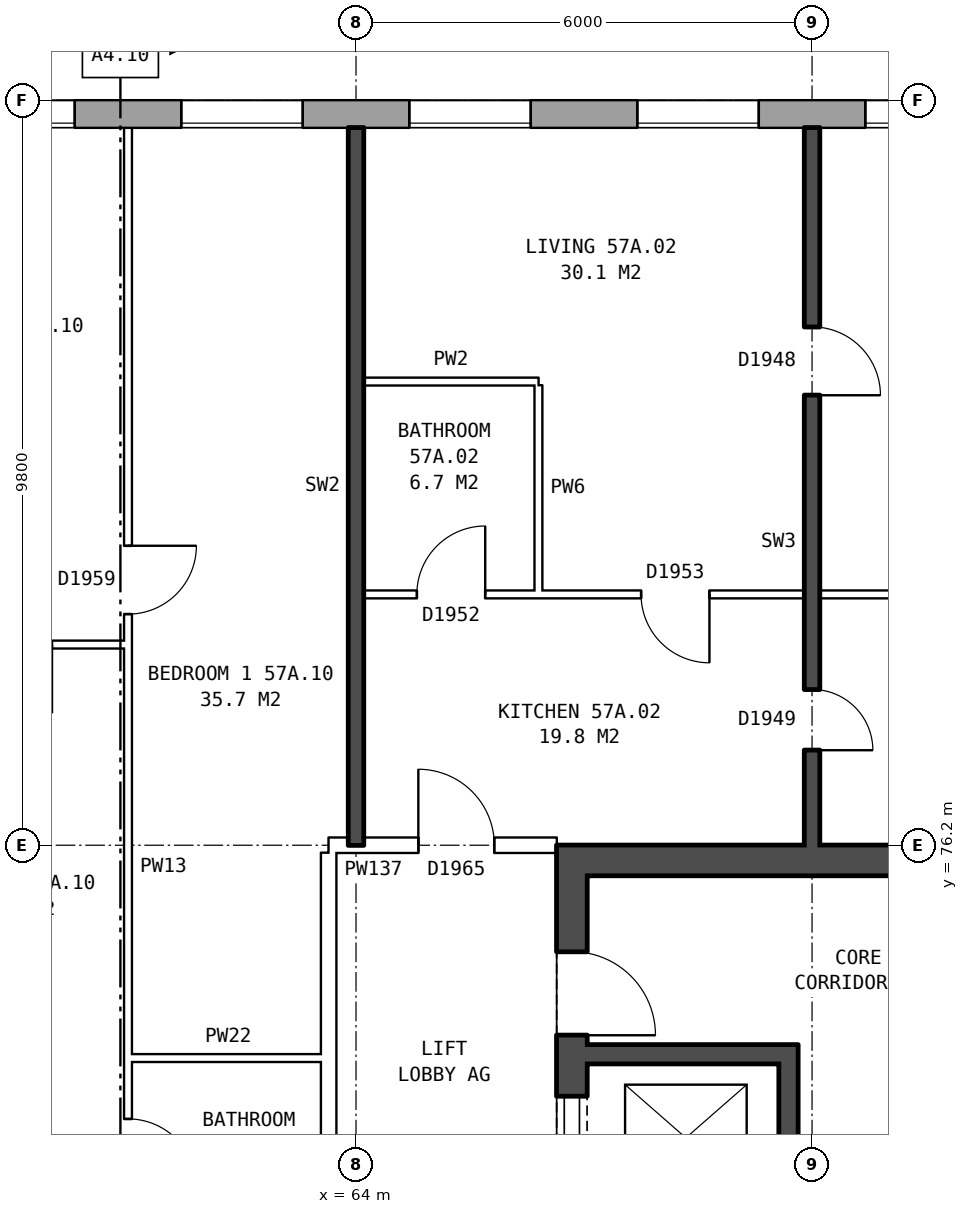
"""IFC4 building model, lengths in metres.
Left out: names, types, materials, properties, quantities, classifications, styles, units other than length and angle.
Written with IfcOpenShell. Run it as: python <this file> out.ifc"""

import sys

from ifc_helpers import new_model, si_unit, direction, frame, frame_2d, origin, place, context, subcontext, project, spatial, rectangle, extrude, element, fill, save


model = new_model("IFC4")
c1 = context("Model", 3, precision=1e-05, world=origin(), true_north=direction((0.0, 1.0)))
c2 = subcontext(c1, "Body", "Model", "MODEL_VIEW")
j1 = project(units=[si_unit("LENGTHUNIT", "METRE"), si_unit("PLANEANGLEUNIT", "RADIAN")], contexts=[c1])
p1 = place(None, origin())
s1 = spatial("IfcSite", under=j1, at=p1, CompositionType="ELEMENT")
p2 = place(p1, origin())
s2 = spatial("IfcBuilding", under=s1, at=p2, CompositionType="ELEMENT")
p3 = place(p2, frame((0.0, 0.0, 202.8)))
s3 = spatial("IfcBuildingStorey", under=s2, at=p3, CompositionType="ELEMENT", Elevation=202.8)
p4 = place(p3, frame((74.95, 85.82, 0.0), z_axis=(0.0, 0.0, 1.0), x_axis=(-1.0, 0.0, 0.0)))
e1 = element("IfcWall", 1, at=p4, inside=s3, PredefinedType="STANDARD", context=c2, shape_type="SweptSolid", body=[
    extrude(rectangle(XDim=39.875, YDim=0.36, at=frame_2d((19.938, 0.0))), origin(), (0.0, 0.0, 1.0), 2.85),
])
p5 = place(p4, frame((2.65, 0.0, 0.8)))
e2 = element("IfcOpeningElement", 2, at=p5, cuts=e1, PredefinedType="OPENING", context=c2, shape_type="SweptSolid", body=[
    extrude(rectangle(XDim=1.6, YDim=1.8, at=frame_2d((0.8, 0.9))), frame((0.0, 0.19, 0.0), z_axis=(0.0, -1.0, 0.0), x_axis=(1.0, 0.0, 0.0)), (0.0, 0.0, 1.0), 0.38),
])
p6 = place(p4, frame((5.65, 0.0, 0.8)))
e3 = element("IfcOpeningElement", 3, at=p6, cuts=e1, PredefinedType="OPENING", context=c2, shape_type="SweptSolid", body=[
    extrude(rectangle(XDim=1.6, YDim=1.8, at=frame_2d((0.8, 0.9))), frame((0.0, 0.19, 0.0), z_axis=(0.0, -1.0, 0.0), x_axis=(1.0, 0.0, 0.0)), (0.0, 0.0, 1.0), 0.38),
])
p7 = place(p4, frame((8.65, 0.0, 0.8)))
e4 = element("IfcOpeningElement", 4, at=p7, cuts=e1, PredefinedType="OPENING", context=c2, shape_type="SweptSolid", body=[
    extrude(rectangle(XDim=1.6, YDim=1.8, at=frame_2d((0.8, 0.9))), frame((0.0, 0.19, 0.0), z_axis=(0.0, -1.0, 0.0), x_axis=(1.0, 0.0, 0.0)), (0.0, 0.0, 1.0), 0.38),
])
p8 = place(p4, frame((11.65, 0.0, 0.8)))
e5 = element("IfcOpeningElement", 5, at=p8, cuts=e1, PredefinedType="OPENING", context=c2, shape_type="SweptSolid", body=[
    extrude(rectangle(XDim=1.6, YDim=1.8, at=frame_2d((0.8, 0.9))), frame((0.0, 0.19, 0.0), z_axis=(0.0, -1.0, 0.0), x_axis=(1.0, 0.0, 0.0)), (0.0, 0.0, 1.0), 0.38),
])
p9 = place(p4, frame((14.65, 0.0, 0.8)))
e6 = element("IfcOpeningElement", 6, at=p9, cuts=e1, PredefinedType="OPENING", context=c2, shape_type="SweptSolid", body=[
    extrude(rectangle(XDim=1.6, YDim=1.8, at=frame_2d((0.8, 0.9))), frame((0.0, 0.19, 0.0), z_axis=(0.0, -1.0, 0.0), x_axis=(1.0, 0.0, 0.0)), (0.0, 0.0, 1.0), 0.38),
])
p10 = place(p4, frame((17.65, 0.0, 0.8)))
e7 = element("IfcOpeningElement", 7, at=p10, cuts=e1, PredefinedType="OPENING", context=c2, shape_type="SweptSolid", body=[
    extrude(rectangle(XDim=1.6, YDim=1.8, at=frame_2d((0.8, 0.9))), frame((0.0, 0.19, 0.0), z_axis=(0.0, -1.0, 0.0), x_axis=(1.0, 0.0, 0.0)), (0.0, 0.0, 1.0), 0.38),
])
p11 = place(p4, frame((20.65, 0.0, 0.8)))
e8 = element("IfcOpeningElement", 8, at=p11, cuts=e1, PredefinedType="OPENING", context=c2, shape_type="SweptSolid", body=[
    extrude(rectangle(XDim=1.6, YDim=1.8, at=frame_2d((0.8, 0.9))), frame((0.0, 0.19, 0.0), z_axis=(0.0, -1.0, 0.0), x_axis=(1.0, 0.0, 0.0)), (0.0, 0.0, 1.0), 0.38),
])
p12 = place(p4, frame((23.65, 0.0, 0.8)))
e9 = element("IfcOpeningElement", 9, at=p12, cuts=e1, PredefinedType="OPENING", context=c2, shape_type="SweptSolid", body=[
    extrude(rectangle(XDim=1.6, YDim=1.8, at=frame_2d((0.8, 0.9))), frame((0.0, 0.19, 0.0), z_axis=(0.0, -1.0, 0.0), x_axis=(1.0, 0.0, 0.0)), (0.0, 0.0, 1.0), 0.38),
])
p13 = place(p4, frame((26.65, 0.0, 0.8)))
e10 = element("IfcOpeningElement", 10, at=p13, cuts=e1, PredefinedType="OPENING", context=c2, shape_type="SweptSolid", body=[
    extrude(rectangle(XDim=1.6, YDim=1.8, at=frame_2d((0.8, 0.9))), frame((0.0, 0.19, 0.0), z_axis=(0.0, -1.0, 0.0), x_axis=(1.0, 0.0, 0.0)), (0.0, 0.0, 1.0), 0.38),
])
p14 = place(p4, frame((29.65, 0.0, 0.8)))
e11 = element("IfcOpeningElement", 11, at=p14, cuts=e1, PredefinedType="OPENING", context=c2, shape_type="SweptSolid", body=[
    extrude(rectangle(XDim=1.6, YDim=1.8, at=frame_2d((0.8, 0.9))), frame((0.0, 0.19, 0.0), z_axis=(0.0, -1.0, 0.0), x_axis=(1.0, 0.0, 0.0)), (0.0, 0.0, 1.0), 0.38),
])
p15 = place(p4, frame((32.65, 0.0, 0.8)))
e12 = element("IfcOpeningElement", 12, at=p15, cuts=e1, PredefinedType="OPENING", context=c2, shape_type="SweptSolid", body=[
    extrude(rectangle(XDim=1.6, YDim=1.8, at=frame_2d((0.8, 0.9))), frame((0.0, 0.19, 0.0), z_axis=(0.0, -1.0, 0.0), x_axis=(1.0, 0.0, 0.0)), (0.0, 0.0, 1.0), 0.38),
])
p16 = place(p4, frame((35.65, 0.0, 0.8)))
e13 = element("IfcOpeningElement", 13, at=p16, cuts=e1, PredefinedType="OPENING", context=c2, shape_type="SweptSolid", body=[
    extrude(rectangle(XDim=1.6, YDim=1.8, at=frame_2d((0.8, 0.9))), frame((0.0, 0.19, 0.0), z_axis=(0.0, -1.0, 0.0), x_axis=(1.0, 0.0, 0.0)), (0.0, 0.0, 1.0), 0.38),
])
p17 = place(p3, frame((66.84, 63.8, 0.0), z_axis=(0.0, 0.0, 1.0), x_axis=(0.0, 1.0, 0.0)))
e14 = element("IfcWall", 14, at=p17, inside=s3, PredefinedType="SHEAR", context=c2, shape_type="SweptSolid", body=[
    extrude(rectangle(XDim=12.4, YDim=0.4, at=frame_2d((6.2, 0.0))), origin(), (0.0, 0.0, 1.0), 2.85),
])
p18 = place(p17, frame((1.325, 0.0, 0.0)))
e15 = element("IfcOpeningElement", 15, at=p18, cuts=e14, PredefinedType="OPENING", context=c2, shape_type="SweptSolid", body=[
    extrude(rectangle(XDim=1.1, YDim=2.1, at=frame_2d((0.55, 1.05))), frame((0.0, 0.21, 0.0), z_axis=(0.0, -1.0, 0.0), x_axis=(1.0, 0.0, 0.0)), (0.0, 0.0, 1.0), 0.42),
])
p19 = place(p17, frame((3.6, 0.0, 0.0)))
e16 = element("IfcOpeningElement", 16, at=p19, cuts=e14, PredefinedType="OPENING", context=c2, shape_type="SweptSolid", body=[
    extrude(rectangle(XDim=1.1, YDim=2.1, at=frame_2d((0.55, 1.05))), frame((0.0, 0.21, 0.0), z_axis=(0.0, -1.0, 0.0), x_axis=(1.0, 0.0, 0.0)), (0.0, 0.0, 1.0), 0.42),
])
p20 = place(p17, frame((5.8, 0.0, 0.0)))
e17 = element("IfcOpeningElement", 17, at=p20, cuts=e14, PredefinedType="OPENING", context=c2, shape_type="SweptSolid", body=[
    extrude(rectangle(XDim=1.1, YDim=2.1, at=frame_2d((0.55, 1.05))), frame((0.0, 0.21, 0.0), z_axis=(0.0, -1.0, 0.0), x_axis=(1.0, 0.0, 0.0)), (0.0, 0.0, 1.0), 0.42),
])
p21 = place(p17, frame((8.0, 0.0, 0.0)))
e18 = element("IfcOpeningElement", 18, at=p21, cuts=e14, PredefinedType="OPENING", context=c2, shape_type="SweptSolid", body=[
    extrude(rectangle(XDim=1.1, YDim=2.1, at=frame_2d((0.55, 1.05))), frame((0.0, 0.21, 0.0), z_axis=(0.0, -1.0, 0.0), x_axis=(1.0, 0.0, 0.0)), (0.0, 0.0, 1.0), 0.42),
])
p22 = place(p17, frame((9.9, 0.0, 0.0)))
e19 = element("IfcOpeningElement", 19, at=p22, cuts=e14, PredefinedType="OPENING", context=c2, shape_type="SweptSolid", body=[
    extrude(rectangle(XDim=1.1, YDim=2.1, at=frame_2d((0.55, 1.05))), frame((0.0, 0.21, 0.0), z_axis=(0.0, -1.0, 0.0), x_axis=(1.0, 0.0, 0.0)), (0.0, 0.0, 1.0), 0.42),
])
p23 = place(p3, frame((67.04, 76.0, 0.0), z_axis=(0.0, 0.0, 1.0), x_axis=(1.0, 0.0, 0.0)))
e20 = element("IfcWall", 20, at=p23, inside=s3, PredefinedType="SHEAR", context=c2, shape_type="SweptSolid", body=[
    extrude(rectangle(XDim=8.2, YDim=0.4, at=frame_2d((4.1, 0.0))), origin(), (0.0, 0.0, 1.0), 2.85),
])
p24 = place(p3, frame((67.04, 73.45, 0.0), z_axis=(0.0, 0.0, 1.0), x_axis=(1.0, 0.0, 0.0)))
e21 = element("IfcWall", 21, at=p24, inside=s3, PredefinedType="SHEAR", context=c2, shape_type="SweptSolid", body=[
    extrude(rectangle(XDim=2.525, YDim=0.25, at=frame_2d((1.262, 0.0))), origin(), (0.0, 0.0, 1.0), 2.85),
])
p25 = place(p3, frame((69.69, 66.975, 0.0), z_axis=(0.0, 0.0, 1.0), x_axis=(0.0, 1.0, 0.0)))
e22 = element("IfcWall", 22, at=p25, inside=s3, PredefinedType="SHEAR", context=c2, shape_type="SweptSolid", body=[
    extrude(rectangle(XDim=6.6, YDim=0.25, at=frame_2d((3.3, 0.0))), origin(), (0.0, 0.0, 1.0), 2.85),
])
p26 = place(p3, frame((63.64, 63.9, 0.0), z_axis=(0.0, 0.0, 1.0), x_axis=(0.0, 1.0, 0.0)))
e23 = element("IfcWall", 23, at=p26, inside=s3, PredefinedType="PARTITIONING", context=c2, shape_type="SweptSolid", body=[
    extrude(rectangle(XDim=12.2, YDim=0.2, at=frame_2d((6.1, 0.0))), origin(), (0.0, 0.0, 1.0), 2.85),
])
p27 = place(p26, frame((5.1, 0.0, 0.0)))
e24 = element("IfcOpeningElement", 24, at=p27, cuts=e23, PredefinedType="OPENING", context=c2, shape_type="SweptSolid", body=[
    extrude(rectangle(XDim=2.0, YDim=2.1, at=frame_2d((1.0, 1.05))), frame((0.0, 0.11, 0.0), z_axis=(0.0, -1.0, 0.0), x_axis=(1.0, 0.0, 0.0)), (0.0, 0.0, 1.0), 0.22),
])
p28 = place(p3, frame((61.0, 73.4, 0.0), z_axis=(0.0, 0.0, 1.0), x_axis=(1.0, 0.0, 0.0)))
e25 = element("IfcWall", 25, at=p28, inside=s3, PredefinedType="PARTITIONING", context=c2, shape_type="SweptSolid", body=[
    extrude(rectangle(XDim=2.64, YDim=0.1, at=frame_2d((1.32, 0.0))), origin(), (0.0, 0.0, 1.0), 2.85),
])
p29 = place(p3, frame((63.64, 76.2, 0.0), z_axis=(0.0, 0.0, 1.0), x_axis=(1.0, 0.0, 0.0)))
e26 = element("IfcWall", 26, at=p29, inside=s3, PredefinedType="PARTITIONING", context=c2, shape_type="SweptSolid", body=[
    extrude(rectangle(XDim=3.0, YDim=0.2, at=frame_2d((1.5, 0.0))), origin(), (0.0, 0.0, 1.0), 2.85),
])
p30 = place(p29, frame((1.18, 0.0, 0.0)))
e27 = element("IfcOpeningElement", 27, at=p30, cuts=e26, PredefinedType="OPENING", context=c2, shape_type="SweptSolid", body=[
    extrude(rectangle(XDim=1.0, YDim=2.1, at=frame_2d((0.5, 1.05))), frame((0.0, 0.11, 0.0), z_axis=(0.0, -1.0, 0.0), x_axis=(1.0, 0.0, 0.0)), (0.0, 0.0, 1.0), 0.22),
])
p31 = place(p3, frame((58.1, 78.84, 0.0), z_axis=(0.0, 0.0, 1.0), x_axis=(1.0, 0.0, 0.0)))
e28 = element("IfcWall", 28, at=p31, inside=s3, PredefinedType="PARTITIONING", context=c2, shape_type="SweptSolid", body=[
    extrude(rectangle(XDim=2.9, YDim=0.1, at=frame_2d((1.45, 0.0))), origin(), (0.0, 0.0, 1.0), 2.85),
])
p32 = place(p31, frame((1.0, 0.0, 0.0)))
e29 = element("IfcOpeningElement", 29, at=p32, cuts=e28, PredefinedType="OPENING", context=c2, shape_type="SweptSolid", body=[
    extrude(rectangle(XDim=0.9, YDim=2.1, at=frame_2d((0.45, 1.05))), frame((0.0, 0.06, 0.0), z_axis=(0.0, -1.0, 0.0), x_axis=(1.0, 0.0, 0.0)), (0.0, 0.0, 1.0), 0.12),
])
p33 = place(p3, frame((64.1, 79.5, 0.0), z_axis=(0.0, 0.0, 1.0), x_axis=(1.0, 0.0, 0.0)))
e30 = element("IfcWall", 30, at=p33, inside=s3, PredefinedType="PARTITIONING", context=c2, shape_type="SweptSolid", body=[
    extrude(rectangle(XDim=11.8, YDim=0.1, at=frame_2d((5.9, 0.0))), origin(), (0.0, 0.0, 1.0), 2.85),
])
p34 = place(p33, frame((3.65, 0.0, 0.0)))
e31 = element("IfcOpeningElement", 31, at=p34, cuts=e30, PredefinedType="OPENING", context=c2, shape_type="SweptSolid", body=[
    extrude(rectangle(XDim=0.9, YDim=2.1, at=frame_2d((0.45, 1.05))), frame((0.0, 0.06, 0.0), z_axis=(0.0, -1.0, 0.0), x_axis=(1.0, 0.0, 0.0)), (0.0, 0.0, 1.0), 0.12),
])
p35 = place(p33, frame((0.7, 0.0, 0.0)))
e32 = element("IfcOpeningElement", 32, at=p35, cuts=e30, PredefinedType="OPENING", context=c2, shape_type="SweptSolid", body=[
    extrude(rectangle(XDim=0.9, YDim=2.1, at=frame_2d((0.45, 1.05))), frame((0.0, 0.06, 0.0), z_axis=(0.0, -1.0, 0.0), x_axis=(1.0, 0.0, 0.0)), (0.0, 0.0, 1.0), 0.12),
])
p36 = place(p3, frame((64.1, 82.3, 0.0), z_axis=(0.0, 0.0, 1.0), x_axis=(1.0, 0.0, 0.0)))
e33 = element("IfcWall", 33, at=p36, inside=s3, PredefinedType="PARTITIONING", context=c2, shape_type="SweptSolid", body=[
    extrude(rectangle(XDim=2.3, YDim=0.1, at=frame_2d((1.15, 0.0))), origin(), (0.0, 0.0, 1.0), 2.85),
])
p37 = place(p3, frame((61.0, 71.3, 0.0), z_axis=(0.0, 0.0, 1.0), x_axis=(0.0, 1.0, 0.0)))
e34 = element("IfcWall", 34, at=p37, inside=s3, PredefinedType="PARTITIONING", context=c2, shape_type="SweptSolid", body=[
    extrude(rectangle(XDim=14.34, YDim=0.1, at=frame_2d((7.17, 0.0))), origin(), (0.0, 0.0, 1.0), 2.85),
])
p38 = place(p37, frame((7.94, 0.0, 0.0)))
e35 = element("IfcOpeningElement", 35, at=p38, cuts=e34, PredefinedType="OPENING", context=c2, shape_type="SweptSolid", body=[
    extrude(rectangle(XDim=0.9, YDim=2.1, at=frame_2d((0.45, 1.05))), frame((0.0, 0.06, 0.0), z_axis=(0.0, -1.0, 0.0), x_axis=(1.0, 0.0, 0.0)), (0.0, 0.0, 1.0), 0.12),
])
p39 = place(p37, frame((0.4, 0.0, 0.0)))
e36 = element("IfcOpeningElement", 36, at=p39, cuts=e34, PredefinedType="OPENING", context=c2, shape_type="SweptSolid", body=[
    extrude(rectangle(XDim=0.9, YDim=2.1, at=frame_2d((0.45, 1.05))), frame((0.0, 0.06, 0.0), z_axis=(0.0, -1.0, 0.0), x_axis=(1.0, 0.0, 0.0)), (0.0, 0.0, 1.0), 0.12),
])
p40 = place(p3, frame((64.0, 76.2, 0.0), z_axis=(0.0, 0.0, 1.0), x_axis=(0.0, 1.0, 0.0)))
e37 = element("IfcWall", 37, at=p40, inside=s3, PredefinedType="SOLIDWALL", context=c2, shape_type="SweptSolid", body=[
    extrude(rectangle(XDim=9.44, YDim=0.2, at=frame_2d((4.72, 0.0))), origin(), (0.0, 0.0, 1.0), 2.85),
])
p41 = place(p3, frame((66.4, 79.55, 0.0), z_axis=(0.0, 0.0, 1.0), x_axis=(0.0, 1.0, 0.0)))
e38 = element("IfcWall", 38, at=p41, inside=s3, PredefinedType="PARTITIONING", context=c2, shape_type="SweptSolid", body=[
    extrude(rectangle(XDim=2.7, YDim=0.1, at=frame_2d((1.35, 0.0))), origin(), (0.0, 0.0, 1.0), 2.85),
])
p42 = place(p3, frame((70.0, 76.2, 0.0), z_axis=(0.0, 0.0, 1.0), x_axis=(0.0, 1.0, 0.0)))
e39 = element("IfcWall", 39, at=p42, inside=s3, PredefinedType="SOLIDWALL", context=c2, shape_type="SweptSolid", body=[
    extrude(rectangle(XDim=9.44, YDim=0.2, at=frame_2d((4.72, 0.0))), origin(), (0.0, 0.0, 1.0), 2.85),
])
p43 = place(p42, frame((5.92, 0.0, 0.0)))
e40 = element("IfcOpeningElement", 40, at=p43, cuts=e39, PredefinedType="OPENING", context=c2, shape_type="SweptSolid", body=[
    extrude(rectangle(XDim=0.9, YDim=2.1, at=frame_2d((0.45, 1.05))), frame((0.0, 0.11, 0.0), z_axis=(0.0, -1.0, 0.0), x_axis=(1.0, 0.0, 0.0)), (0.0, 0.0, 1.0), 0.22),
])
p44 = place(p42, frame((1.25, 0.0, 0.0)))
e41 = element("IfcOpeningElement", 41, at=p44, cuts=e39, PredefinedType="OPENING", context=c2, shape_type="SweptSolid", body=[
    extrude(rectangle(XDim=0.8, YDim=2.1, at=frame_2d((0.4, 1.05))), frame((0.0, 0.11, 0.0), z_axis=(0.0, -1.0, 0.0), x_axis=(1.0, 0.0, 0.0)), (0.0, 0.0, 1.0), 0.22),
])
p45 = place(p5, origin())
e42 = element("IfcWindow", 42, at=p45, inside=s3, PartitioningType="SINGLE_PANEL", PredefinedType="WINDOW", context=c2, shape_type="SweptSolid", body=[
    extrude(rectangle(XDim=1.6, YDim=1.8, at=frame_2d((0.8, 0.9))), frame((0.0, 0.15, 0.0), z_axis=(0.0, -1.0, 0.0), x_axis=(1.0, 0.0, 0.0)), (0.0, 0.0, 1.0), 0.06),
])
fill(e2, e42)
p46 = place(p6, origin())
e43 = element("IfcWindow", 43, at=p46, inside=s3, PartitioningType="SINGLE_PANEL", PredefinedType="WINDOW", context=c2, shape_type="SweptSolid", body=[
    extrude(rectangle(XDim=1.6, YDim=1.8, at=frame_2d((0.8, 0.9))), frame((0.0, 0.15, 0.0), z_axis=(0.0, -1.0, 0.0), x_axis=(1.0, 0.0, 0.0)), (0.0, 0.0, 1.0), 0.06),
])
fill(e3, e43)
p47 = place(p7, origin())
e44 = element("IfcWindow", 44, at=p47, inside=s3, PartitioningType="SINGLE_PANEL", PredefinedType="WINDOW", context=c2, shape_type="SweptSolid", body=[
    extrude(rectangle(XDim=1.6, YDim=1.8, at=frame_2d((0.8, 0.9))), frame((0.0, 0.15, 0.0), z_axis=(0.0, -1.0, 0.0), x_axis=(1.0, 0.0, 0.0)), (0.0, 0.0, 1.0), 0.06),
])
fill(e4, e44)
p48 = place(p8, origin())
e45 = element("IfcWindow", 45, at=p48, inside=s3, PartitioningType="SINGLE_PANEL", PredefinedType="WINDOW", context=c2, shape_type="SweptSolid", body=[
    extrude(rectangle(XDim=1.6, YDim=1.8, at=frame_2d((0.8, 0.9))), frame((0.0, 0.15, 0.0), z_axis=(0.0, -1.0, 0.0), x_axis=(1.0, 0.0, 0.0)), (0.0, 0.0, 1.0), 0.06),
])
fill(e5, e45)
p49 = place(p9, origin())
e46 = element("IfcWindow", 46, at=p49, inside=s3, PartitioningType="SINGLE_PANEL", PredefinedType="WINDOW", context=c2, shape_type="SweptSolid", body=[
    extrude(rectangle(XDim=1.6, YDim=1.8, at=frame_2d((0.8, 0.9))), frame((0.0, 0.15, 0.0), z_axis=(0.0, -1.0, 0.0), x_axis=(1.0, 0.0, 0.0)), (0.0, 0.0, 1.0), 0.06),
])
fill(e6, e46)
p50 = place(p21, origin())
e47 = element("IfcDoor", 47, at=p50, inside=s3, OperationType="DOUBLE_DOOR_SLIDING", PredefinedType="DOOR", context=c2, shape_type="SweptSolid", body=[
    extrude(rectangle(XDim=1.1, YDim=2.1, at=frame_2d((0.55, 1.05))), frame((0.0, -0.135, 0.0), z_axis=(0.0, -1.0, 0.0), x_axis=(1.0, 0.0, 0.0)), (0.0, 0.0, 1.0), 0.05),
])
fill(e18, e47)
p51 = place(p22, frame((1.1, 0.0, 0.0), z_axis=(0.0, 0.0, 1.0), x_axis=(-1.0, 0.0, 0.0)))
e48 = element("IfcDoor", 48, at=p51, inside=s3, OperationType="SINGLE_SWING_RIGHT", PredefinedType="DOOR", context=c2, shape_type="SweptSolid", body=[
    extrude(rectangle(XDim=1.1, YDim=2.1, at=frame_2d((0.55, 1.05))), frame((0.0, 0.185, 0.0), z_axis=(0.0, -1.0, 0.0), x_axis=(1.0, 0.0, 0.0)), (0.0, 0.0, 1.0), 0.05),
])
fill(e19, e48)
p52 = place(p43, frame((0.9, 0.0, 0.0), z_axis=(0.0, 0.0, 1.0), x_axis=(-1.0, 0.0, 0.0)))
e49 = element("IfcDoor", 49, at=p52, inside=s3, OperationType="SINGLE_SWING_RIGHT", PredefinedType="DOOR", context=c2, shape_type="SweptSolid", body=[
    extrude(rectangle(XDim=0.9, YDim=2.1, at=frame_2d((0.45, 1.05))), frame((0.0, 0.025, 0.0), z_axis=(0.0, -1.0, 0.0), x_axis=(1.0, 0.0, 0.0)), (0.0, 0.0, 1.0), 0.05),
])
fill(e40, e49)
p53 = place(p30, origin())
e50 = element("IfcDoor", 50, at=p53, inside=s3, OperationType="SINGLE_SWING_LEFT", PredefinedType="DOOR", context=c2, shape_type="SweptSolid", body=[
    extrude(rectangle(XDim=1.0, YDim=2.1, at=frame_2d((0.5, 1.05))), frame((0.0, 0.025, 0.0), z_axis=(0.0, -1.0, 0.0), x_axis=(1.0, 0.0, 0.0)), (0.0, 0.0, 1.0), 0.05),
])
fill(e27, e50)
p54 = place(p34, frame((0.9, 0.0, 0.0), z_axis=(0.0, 0.0, 1.0), x_axis=(-1.0, 0.0, 0.0)))
e51 = element("IfcDoor", 51, at=p54, inside=s3, OperationType="SINGLE_SWING_LEFT", PredefinedType="DOOR", context=c2, shape_type="SweptSolid", body=[
    extrude(rectangle(XDim=0.9, YDim=2.1, at=frame_2d((0.45, 1.05))), frame((0.0, 0.025, 0.0), z_axis=(0.0, -1.0, 0.0), x_axis=(1.0, 0.0, 0.0)), (0.0, 0.0, 1.0), 0.05),
])
fill(e31, e51)
p55 = place(p44, frame((0.8, 0.0, 0.0), z_axis=(0.0, 0.0, 1.0), x_axis=(-1.0, 0.0, 0.0)))
e52 = element("IfcDoor", 52, at=p55, inside=s3, OperationType="SINGLE_SWING_RIGHT", PredefinedType="DOOR", context=c2, shape_type="SweptSolid", body=[
    extrude(rectangle(XDim=0.8, YDim=2.1, at=frame_2d((0.4, 1.05))), frame((0.0, 0.025, 0.0), z_axis=(0.0, -1.0, 0.0), x_axis=(1.0, 0.0, 0.0)), (0.0, 0.0, 1.0), 0.05),
])
fill(e41, e52)
p56 = place(p35, origin())
e53 = element("IfcDoor", 53, at=p56, inside=s3, OperationType="SINGLE_SWING_RIGHT", PredefinedType="DOOR", context=c2, shape_type="SweptSolid", body=[
    extrude(rectangle(XDim=0.9, YDim=2.1, at=frame_2d((0.45, 1.05))), frame((0.0, 0.025, 0.0), z_axis=(0.0, -1.0, 0.0), x_axis=(1.0, 0.0, 0.0)), (0.0, 0.0, 1.0), 0.05),
])
fill(e32, e53)
p57 = place(p38, frame((0.9, 0.0, 0.0), z_axis=(0.0, 0.0, 1.0), x_axis=(-1.0, 0.0, 0.0)))
e54 = element("IfcDoor", 54, at=p57, inside=s3, OperationType="SINGLE_SWING_LEFT", PredefinedType="DOOR", context=c2, shape_type="SweptSolid", body=[
    extrude(rectangle(XDim=0.9, YDim=2.1, at=frame_2d((0.45, 1.05))), frame((0.0, 0.025, 0.0), z_axis=(0.0, -1.0, 0.0), x_axis=(1.0, 0.0, 0.0)), (0.0, 0.0, 1.0), 0.05),
])
fill(e35, e54)
p58 = place(p39, frame((0.9, 0.0, 0.0), z_axis=(0.0, 0.0, 1.0), x_axis=(-1.0, 0.0, 0.0)))
e55 = element("IfcDoor", 55, at=p58, inside=s3, OperationType="SINGLE_SWING_RIGHT", PredefinedType="DOOR", context=c2, shape_type="SweptSolid", body=[
    extrude(rectangle(XDim=0.9, YDim=2.1, at=frame_2d((0.45, 1.05))), frame((0.0, 0.025, 0.0), z_axis=(0.0, -1.0, 0.0), x_axis=(1.0, 0.0, 0.0)), (0.0, 0.0, 1.0), 0.05),
])
fill(e36, e55)
save(model, sys.argv[1])
